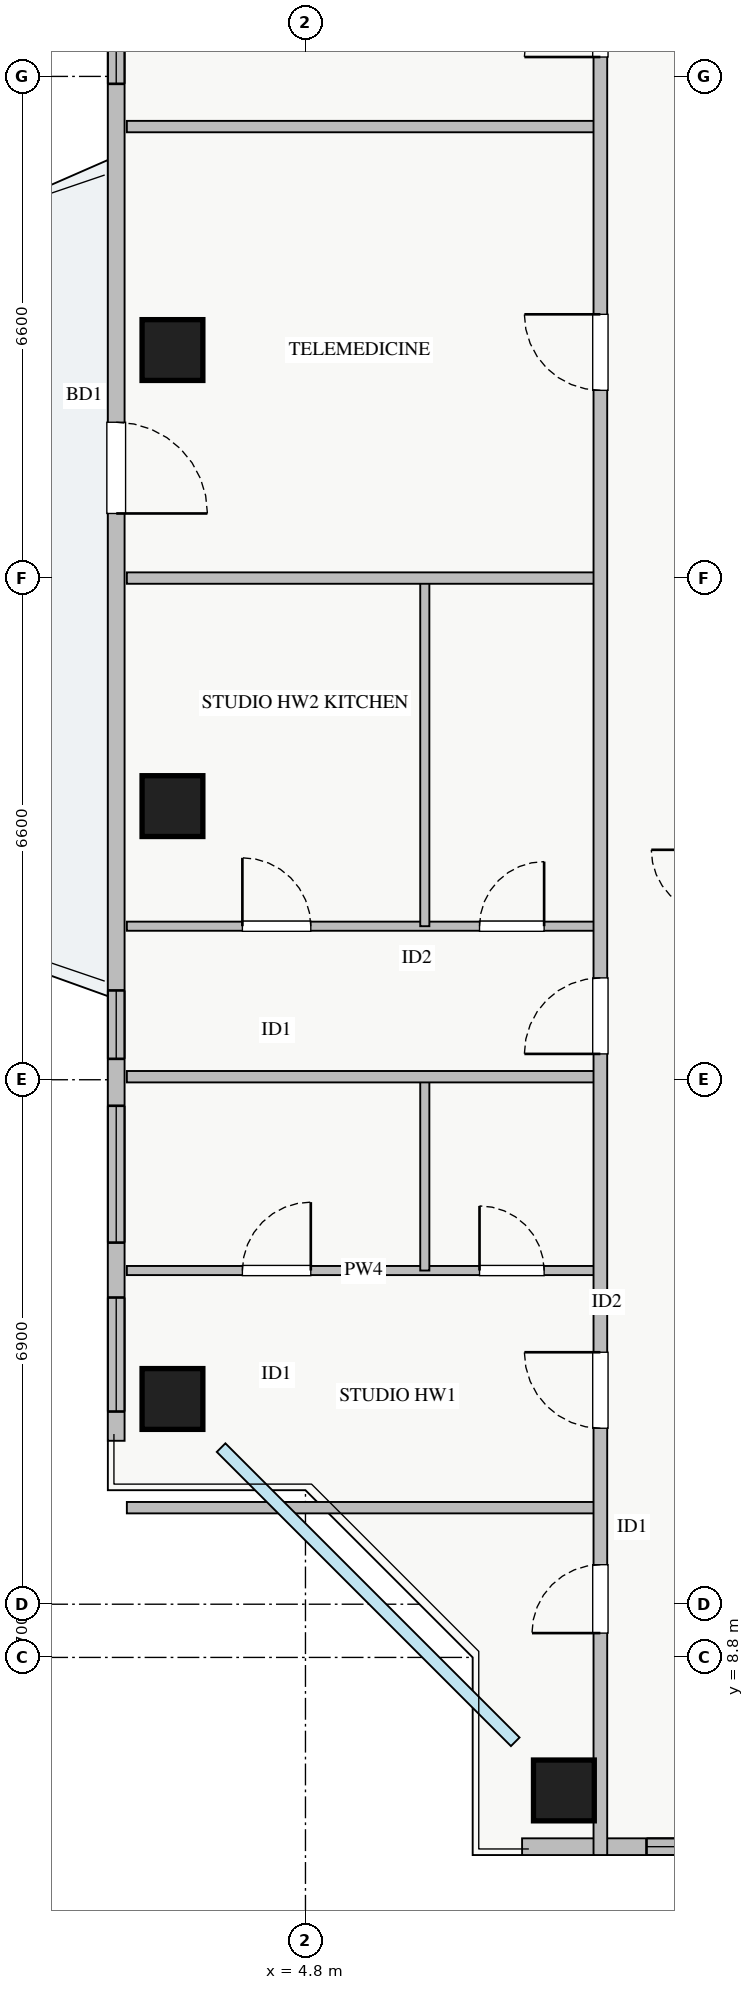
"""IFC4 building model, lengths in metres.
Left out: names, types, materials, properties, quantities, classifications, styles, units other than length and angle.
Written with IfcOpenShell. Run it as: python <this file> out.ifc"""

import sys

from ifc_helpers import new_model, si_unit, direction, frame, frame_2d, origin, origin_2d, place, context, subcontext, project, spatial, rectangle, extrude, source, transform, mapped, element, fill, save


model = new_model("IFC4")
c1 = context("Model", 3, precision=1e-05, world=origin(), true_north=direction((0.0, 1.0)))
c2 = subcontext(c1, "Body", "Model", "MODEL_VIEW")
j1 = project(units=[si_unit("LENGTHUNIT", "METRE"), si_unit("PLANEANGLEUNIT", "RADIAN")], contexts=[c1])
p1 = place(None, origin())
s1 = spatial("IfcSite", under=j1, at=p1, CompositionType="ELEMENT")
p2 = place(p1, origin())
s2 = spatial("IfcBuilding", under=s1, at=p2, CompositionType="ELEMENT")
p3 = place(p2, frame((0.0, 0.0, 216.5)))
s3 = spatial("IfcBuildingStorey", under=s2, at=p3, CompositionType="ELEMENT", Elevation=216.5)
m1 = source(origin(), c2, "Body", "SweptSolid", [
    extrude(rectangle(XDim=0.8, YDim=0.8, at=origin_2d()), origin(), (0.0, 0.0, 1.0), 3.25),
])
for number, where, z_axis, x_axis in (
    (1, (8.2, 7.05, 0.0), (0.0, 0.0, 1.0), (1.0, 0.0, 0.0)),
    (2, (3.05, 26.0, 0.0), (0.0, 0.0, 1.0), (1.0, 0.0, 0.0)),
    (3, (3.05, 20.0, 0.0), (0.0, 0.0, 1.0), (1.0, 0.0, 0.0)),
    (4, (3.05, 12.2, 0.0), (0.0, 0.0, 1.0), (1.0, 0.0, 0.0)),
):
    element("IfcColumn", number, at=place(p3, frame(where, z_axis=z_axis, x_axis=x_axis)), inside=s3, PredefinedType="COLUMN", context=c2, shape_type="MappedRepresentation", body=[
        mapped(m1, transform((0.0, 0.0, 0.0), x_axis=(1.0, 0.0, 0.0), y_axis=(0.0, 1.0, 0.0), z_axis=(0.0, 0.0, 1.0), scale=1.0)),
    ])
p4 = place(p3, frame((7.65, 6.31, 0.0), z_axis=(0.0, 0.0, 1.0), x_axis=(1.0, 0.0, 0.0)))
e5 = element("IfcWall", 5, at=p4, inside=s3, PredefinedType="STANDARD", context=c2, shape_type="SweptSolid", body=[
    extrude(rectangle(XDim=22.7, YDim=0.22, at=frame_2d((11.35, 0.0))), origin(), (0.0, 0.0, 1.0), 2.61),
])
p5 = place(p4, frame((12.2, 0.0, 0.0)))
e6 = element("IfcOpeningElement", 6, at=p5, cuts=e5, PredefinedType="OPENING", context=c2, shape_type="SweptSolid", body=[
    extrude(rectangle(XDim=1.2, YDim=2.1, at=frame_2d((0.6, 1.05))), frame((0.0, 0.12, 0.0), z_axis=(0.0, -1.0, 0.0), x_axis=(1.0, 0.0, 0.0)), (0.0, 0.0, 1.0), 0.24),
])
p6 = place(p4, frame((1.637, 0.0, 0.9)))
e7 = element("IfcOpeningElement", 7, at=p6, cuts=e5, PredefinedType="OPENING", context=c2, shape_type="SweptSolid", body=[
    extrude(rectangle(XDim=2.4, YDim=1.48, at=frame_2d((1.2, 0.74))), frame((0.0, 0.12, 0.0), z_axis=(0.0, -1.0, 0.0), x_axis=(1.0, 0.0, 0.0)), (0.0, 0.0, 1.0), 0.24),
])
p7 = place(p4, frame((7.612, 0.0, 0.9)))
e8 = element("IfcOpeningElement", 8, at=p7, cuts=e5, PredefinedType="OPENING", context=c2, shape_type="SweptSolid", body=[
    extrude(rectangle(XDim=1.8, YDim=1.45, at=frame_2d((0.9, 0.725))), frame((0.0, 0.12, 0.0), z_axis=(0.0, -1.0, 0.0), x_axis=(1.0, 0.0, 0.0)), (0.0, 0.0, 1.0), 0.24),
])
p8 = place(p4, frame((19.837, 0.0, 0.9)))
e9 = element("IfcOpeningElement", 9, at=p8, cuts=e5, PredefinedType="OPENING", context=c2, shape_type="SweptSolid", body=[
    extrude(rectangle(XDim=2.1, YDim=1.5, at=frame_2d((1.05, 0.75))), frame((0.0, 0.12, 0.0), z_axis=(0.0, -1.0, 0.0), x_axis=(1.0, 0.0, 0.0)), (0.0, 0.0, 1.0), 0.24),
])
p9 = place(p3, frame((2.31, 11.65, 0.0), z_axis=(0.0, 0.0, 1.0), x_axis=(0.0, 1.0, 0.0)))
e10 = element("IfcWall", 10, at=p9, inside=s3, PredefinedType="STANDARD", context=c2, shape_type="SweptSolid", body=[
    extrude(rectangle(XDim=22.7, YDim=0.22, at=frame_2d((11.35, 0.0))), origin(), (0.0, 0.0, 1.0), 2.61),
])
p10 = place(p9, frame((12.2, 0.0, 0.0)))
e11 = element("IfcOpeningElement", 11, at=p10, cuts=e10, PredefinedType="OPENING", context=c2, shape_type="SweptSolid", body=[
    extrude(rectangle(XDim=1.2, YDim=2.1, at=frame_2d((0.6, 1.05))), frame((0.0, 0.12, 0.0), z_axis=(0.0, -1.0, 0.0), x_axis=(1.0, 0.0, 0.0)), (0.0, 0.0, 1.0), 0.24),
])
p11 = place(p9, frame((2.607, 0.0, 0.9)))
e12 = element("IfcOpeningElement", 12, at=p11, cuts=e10, PredefinedType="OPENING", context=c2, shape_type="SweptSolid", body=[
    extrude(rectangle(XDim=1.8, YDim=1.5, at=frame_2d((0.9, 0.75))), frame((0.0, 0.12, 0.0), z_axis=(0.0, -1.0, 0.0), x_axis=(1.0, 0.0, 0.0)), (0.0, 0.0, 1.0), 0.24),
])
p12 = place(p9, frame((17.853, 0.0, 0.9)))
e13 = element("IfcOpeningElement", 13, at=p12, cuts=e10, PredefinedType="OPENING", context=c2, shape_type="SweptSolid", body=[
    extrude(rectangle(XDim=2.1, YDim=1.5, at=frame_2d((1.05, 0.75))), frame((0.0, 0.12, 0.0), z_axis=(0.0, -1.0, 0.0), x_axis=(1.0, 0.0, 0.0)), (0.0, 0.0, 1.0), 0.24),
])
p13 = place(p9, frame((0.385, 0.0, 0.9)))
e14 = element("IfcOpeningElement", 14, at=p13, cuts=e10, PredefinedType="OPENING", context=c2, shape_type="SweptSolid", body=[
    extrude(rectangle(XDim=1.5, YDim=1.5, at=frame_2d((0.75, 0.75))), frame((0.0, 0.12, 0.0), z_axis=(0.0, -1.0, 0.0), x_axis=(1.0, 0.0, 0.0)), (0.0, 0.0, 1.0), 0.24),
])
p14 = place(p9, frame((20.835, 0.0, 0.9)))
e15 = element("IfcOpeningElement", 15, at=p14, cuts=e10, PredefinedType="OPENING", context=c2, shape_type="SweptSolid", body=[
    extrude(rectangle(XDim=1.5, YDim=1.5, at=frame_2d((0.75, 0.75))), frame((0.0, 0.12, 0.0), z_axis=(0.0, -1.0, 0.0), x_axis=(1.0, 0.0, 0.0)), (0.0, 0.0, 1.0), 0.24),
])
p15 = place(p9, frame((5.025, 0.0, 0.9)))
e16 = element("IfcOpeningElement", 16, at=p15, cuts=e10, PredefinedType="OPENING", context=c2, shape_type="SweptSolid", body=[
    extrude(rectangle(XDim=0.9, YDim=1.2, at=frame_2d((0.45, 0.6))), frame((0.0, 0.12, 0.0), z_axis=(0.0, -1.0, 0.0), x_axis=(1.0, 0.0, 0.0)), (0.0, 0.0, 1.0), 0.24),
])
p16 = place(p3, frame((2.45, 10.77, 0.0), z_axis=(0.0, 0.0, 1.0), x_axis=(1.0, 0.0, 0.0)))
e17 = element("IfcWall", 17, at=p16, inside=s3, PredefinedType="PARTITIONING", context=c2, shape_type="SweptSolid", body=[
    extrude(rectangle(XDim=6.23, YDim=0.15, at=frame_2d((3.115, 0.0))), origin(), (0.0, 0.0, 1.0), 3.07),
])
p17 = place(p3, frame((2.45, 13.89, 0.0), z_axis=(0.0, 0.0, 1.0), x_axis=(1.0, 0.0, 0.0)))
e18 = element("IfcWall", 18, at=p17, inside=s3, PredefinedType="PLUMBINGWALL", context=c2, shape_type="SweptSolid", body=[
    extrude(rectangle(XDim=6.23, YDim=0.12, at=frame_2d((3.115, 0.0))), origin(), (0.0, 0.0, 1.0), 3.07),
])
p18 = place(p17, frame((1.52, 0.0, 0.0)))
e19 = element("IfcOpeningElement", 19, at=p18, cuts=e18, PredefinedType="OPENING", context=c2, shape_type="SweptSolid", body=[
    extrude(rectangle(XDim=0.9, YDim=2.05, at=frame_2d((0.45, 1.025))), frame((0.0, 0.07, 0.0), z_axis=(0.0, -1.0, 0.0), x_axis=(1.0, 0.0, 0.0)), (0.0, 0.0, 1.0), 0.14),
])
p19 = place(p17, frame((4.64, 0.0, 0.0)))
e20 = element("IfcOpeningElement", 20, at=p19, cuts=e18, PredefinedType="OPENING", context=c2, shape_type="SweptSolid", body=[
    extrude(rectangle(XDim=0.85, YDim=2.05, at=frame_2d((0.425, 1.025))), frame((0.0, 0.07, 0.0), z_axis=(0.0, -1.0, 0.0), x_axis=(1.0, 0.0, 0.0)), (0.0, 0.0, 1.0), 0.14),
])
p20 = place(p3, frame((6.37, 13.89, 0.0), z_axis=(0.0, 0.0, 1.0), x_axis=(0.0, 1.0, 0.0)))
e21 = element("IfcWall", 21, at=p20, inside=s3, PredefinedType="PLUMBINGWALL", context=c2, shape_type="SweptSolid", body=[
    extrude(rectangle(XDim=2.55, YDim=0.12, at=frame_2d((1.275, 0.0))), origin(), (0.0, 0.0, 1.0), 3.07),
])
p21 = place(p3, frame((2.45, 18.42, 0.0), z_axis=(0.0, 0.0, 1.0), x_axis=(1.0, 0.0, 0.0)))
e22 = element("IfcWall", 22, at=p21, inside=s3, PredefinedType="PLUMBINGWALL", context=c2, shape_type="SweptSolid", body=[
    extrude(rectangle(XDim=6.23, YDim=0.12, at=frame_2d((3.115, 0.0))), origin(), (0.0, 0.0, 1.0), 3.07),
])
p22 = place(p21, frame((1.52, 0.0, 0.0)))
e23 = element("IfcOpeningElement", 23, at=p22, cuts=e22, PredefinedType="OPENING", context=c2, shape_type="SweptSolid", body=[
    extrude(rectangle(XDim=0.9, YDim=2.05, at=frame_2d((0.45, 1.025))), frame((0.0, 0.07, 0.0), z_axis=(0.0, -1.0, 0.0), x_axis=(1.0, 0.0, 0.0)), (0.0, 0.0, 1.0), 0.14),
])
p23 = place(p21, frame((4.64, 0.0, 0.0)))
e24 = element("IfcOpeningElement", 24, at=p23, cuts=e22, PredefinedType="OPENING", context=c2, shape_type="SweptSolid", body=[
    extrude(rectangle(XDim=0.85, YDim=2.05, at=frame_2d((0.425, 1.025))), frame((0.0, 0.07, 0.0), z_axis=(0.0, -1.0, 0.0), x_axis=(1.0, 0.0, 0.0)), (0.0, 0.0, 1.0), 0.14),
])
p24 = place(p3, frame((6.37, 18.42, 0.0), z_axis=(0.0, 0.0, 1.0), x_axis=(0.0, 1.0, 0.0)))
e25 = element("IfcWall", 25, at=p24, inside=s3, PredefinedType="PLUMBINGWALL", context=c2, shape_type="SweptSolid", body=[
    extrude(rectangle(XDim=4.58, YDim=0.12, at=frame_2d((2.29, 0.0))), origin(), (0.0, 0.0, 1.0), 3.07),
])
for number, where, z_axis, x_axis in (
    (26, (2.45, 16.44, 0.0), (0.0, 0.0, 1.0), (1.0, 0.0, 0.0)),
    (27, (2.45, 23.0, 0.0), (0.0, 0.0, 1.0), (1.0, 0.0, 0.0)),
    (28, (2.45, 28.94, 0.0), (0.0, 0.0, 1.0), (1.0, 0.0, 0.0)),
):
    element("IfcWall", number, at=place(p3, frame(where, z_axis=z_axis, x_axis=x_axis)), inside=s3, PredefinedType="PARTITIONING", context=c2, shape_type="SweptSolid", body=[
        extrude(rectangle(XDim=6.23, YDim=0.15, at=frame_2d((3.115, 0.0))), origin(), (0.0, 0.0, 1.0), 3.07),
    ])
p25 = place(p3, frame((8.68, 6.2, 0.0), z_axis=(0.0, 0.0, 1.0), x_axis=(0.0, 1.0, 0.0)))
e29 = element("IfcWall", 29, at=p25, inside=s3, PredefinedType="PARTITIONING", context=c2, shape_type="SweptSolid", body=[
    extrude(rectangle(XDim=33.6, YDim=0.18, at=frame_2d((16.8, 0.0))), origin(), (0.0, 0.0, 1.0), 3.07),
])
p26 = place(p25, frame((29.605, 0.0, 0.0)))
e30 = element("IfcOpeningElement", 30, at=p26, cuts=e29, PredefinedType="OPENING", context=c2, shape_type="SweptSolid", body=[
    extrude(rectangle(XDim=0.9, YDim=2.05, at=frame_2d((0.45, 1.025))), frame((0.0, 0.1, 0.0), z_axis=(0.0, -1.0, 0.0), x_axis=(1.0, 0.0, 0.0)), (0.0, 0.0, 1.0), 0.2),
])
p27 = place(p25, frame((2.92, 0.0, 0.0)))
e31 = element("IfcOpeningElement", 31, at=p27, cuts=e29, PredefinedType="OPENING", context=c2, shape_type="SweptSolid", body=[
    extrude(rectangle(XDim=0.9, YDim=2.05, at=frame_2d((0.45, 1.025))), frame((0.0, 0.1, 0.0), z_axis=(0.0, -1.0, 0.0), x_axis=(1.0, 0.0, 0.0)), (0.0, 0.0, 1.0), 0.2),
])
p28 = place(p25, frame((5.615, 0.0, 0.0)))
e32 = element("IfcOpeningElement", 32, at=p28, cuts=e29, PredefinedType="OPENING", context=c2, shape_type="SweptSolid", body=[
    extrude(rectangle(XDim=1.0, YDim=2.05, at=frame_2d((0.5, 1.025))), frame((0.0, 0.1, 0.0), z_axis=(0.0, -1.0, 0.0), x_axis=(1.0, 0.0, 0.0)), (0.0, 0.0, 1.0), 0.2),
])
p29 = place(p25, frame((10.54, 0.0, 0.0)))
e33 = element("IfcOpeningElement", 33, at=p29, cuts=e29, PredefinedType="OPENING", context=c2, shape_type="SweptSolid", body=[
    extrude(rectangle(XDim=1.0, YDim=2.05, at=frame_2d((0.5, 1.025))), frame((0.0, 0.1, 0.0), z_axis=(0.0, -1.0, 0.0), x_axis=(1.0, 0.0, 0.0)), (0.0, 0.0, 1.0), 0.2),
])
p30 = place(p25, frame((19.27, 0.0, 0.0)))
e34 = element("IfcOpeningElement", 34, at=p30, cuts=e29, PredefinedType="OPENING", context=c2, shape_type="SweptSolid", body=[
    extrude(rectangle(XDim=1.0, YDim=2.05, at=frame_2d((0.5, 1.025))), frame((0.0, 0.1, 0.0), z_axis=(0.0, -1.0, 0.0), x_axis=(1.0, 0.0, 0.0)), (0.0, 0.0, 1.0), 0.2),
])
p31 = place(p25, frame((23.655, 0.0, 0.0)))
e35 = element("IfcOpeningElement", 35, at=p31, cuts=e29, PredefinedType="OPENING", context=c2, shape_type="SweptSolid", body=[
    extrude(rectangle(XDim=1.0, YDim=2.05, at=frame_2d((0.5, 1.025))), frame((0.0, 0.1, 0.0), z_axis=(0.0, -1.0, 0.0), x_axis=(1.0, 0.0, 0.0)), (0.0, 0.0, 1.0), 0.2),
])
m2 = source(origin(), c2, "Body", "SweptSolid", [
    extrude(rectangle(XDim=2.4, YDim=1.48, at=frame_2d((1.2, 0.74))), frame((0.0, 0.03, 0.0), z_axis=(0.0, -1.0, 0.0), x_axis=(1.0, 0.0, 0.0)), (0.0, 0.0, 1.0), 0.06),
])
p32 = place(p6, origin())
e36 = element("IfcWindow", 36, at=p32, inside=s3, PartitioningType="TRIPLE_PANEL_VERTICAL", PredefinedType="WINDOW", context=c2, shape_type="MappedRepresentation", body=[
    mapped(m2, transform((0.0, 0.0, 0.0), x_axis=(1.0, 0.0, 0.0), y_axis=(0.0, 1.0, 0.0), z_axis=(0.0, 0.0, 1.0), scale=1.0)),
])
fill(e7, e36)
m3 = source(origin(), c2, "Body", "SweptSolid", [
    extrude(rectangle(XDim=1.2, YDim=2.1, at=frame_2d((0.6, 1.05))), frame((0.0, 0.025, 0.0), z_axis=(0.0, -1.0, 0.0), x_axis=(1.0, 0.0, 0.0)), (0.0, 0.0, 1.0), 0.05),
])
p33 = place(p10, frame((1.2, 0.0, 0.0), z_axis=(0.0, 0.0, 1.0), x_axis=(-1.0, 0.0, 0.0)))
e37 = element("IfcDoor", 37, at=p33, inside=s3, OperationType="SINGLE_SWING_LEFT", PredefinedType="DOOR", context=c2, shape_type="MappedRepresentation", body=[
    mapped(m3, transform((0.0, 0.0, 0.0), x_axis=(1.0, 0.0, 0.0), y_axis=(0.0, 1.0, 0.0), z_axis=(0.0, 0.0, 1.0), scale=1.0)),
])
fill(e11, e37)
m4 = source(origin(), c2, "Body", "SweptSolid", [
    extrude(rectangle(XDim=1.8, YDim=1.5, at=frame_2d((0.9, 0.75))), frame((0.0, 0.03, 0.0), z_axis=(0.0, -1.0, 0.0), x_axis=(1.0, 0.0, 0.0)), (0.0, 0.0, 1.0), 0.06),
])
p34 = place(p11, origin())
e38 = element("IfcWindow", 38, at=p34, inside=s3, PartitioningType="TRIPLE_PANEL_VERTICAL", PredefinedType="WINDOW", context=c2, shape_type="MappedRepresentation", body=[
    mapped(m4, transform((0.0, 0.0, 0.0), x_axis=(1.0, 0.0, 0.0), y_axis=(0.0, 1.0, 0.0), z_axis=(0.0, 0.0, 1.0), scale=1.0)),
])
fill(e12, e38)
m5 = source(origin(), c2, "Body", "SweptSolid", [
    extrude(rectangle(XDim=2.1, YDim=1.5, at=frame_2d((1.05, 0.75))), frame((0.0, 0.03, 0.0), z_axis=(0.0, -1.0, 0.0), x_axis=(1.0, 0.0, 0.0)), (0.0, 0.0, 1.0), 0.06),
])
p35 = place(p12, origin())
e39 = element("IfcWindow", 39, at=p35, inside=s3, PartitioningType="TRIPLE_PANEL_VERTICAL", PredefinedType="WINDOW", context=c2, shape_type="MappedRepresentation", body=[
    mapped(m5, transform((0.0, 0.0, 0.0), x_axis=(1.0, 0.0, 0.0), y_axis=(0.0, 1.0, 0.0), z_axis=(0.0, 0.0, 1.0), scale=1.0)),
])
fill(e13, e39)
m6 = source(origin(), c2, "Body", "SweptSolid", [
    extrude(rectangle(XDim=0.9, YDim=2.05, at=frame_2d((0.45, 1.025))), frame((0.0, 0.025, 0.0), z_axis=(0.0, -1.0, 0.0), x_axis=(1.0, 0.0, 0.0)), (0.0, 0.0, 1.0), 0.05),
])
p36 = place(p18, origin())
e40 = element("IfcDoor", 40, at=p36, inside=s3, OperationType="SINGLE_SWING_RIGHT", PredefinedType="DOOR", context=c2, shape_type="MappedRepresentation", body=[
    mapped(m6, transform((0.0, 0.0, 0.0), x_axis=(1.0, 0.0, 0.0), y_axis=(0.0, 1.0, 0.0), z_axis=(0.0, 0.0, 1.0), scale=1.0)),
])
fill(e19, e40)
m7 = source(origin(), c2, "Body", "SweptSolid", [
    extrude(rectangle(XDim=0.85, YDim=2.05, at=frame_2d((0.425, 1.025))), frame((0.0, 0.025, 0.0), z_axis=(0.0, -1.0, 0.0), x_axis=(1.0, 0.0, 0.0)), (0.0, 0.0, 1.0), 0.05),
])
p37 = place(p19, origin())
e41 = element("IfcDoor", 41, at=p37, inside=s3, OperationType="SINGLE_SWING_LEFT", PredefinedType="DOOR", context=c2, shape_type="MappedRepresentation", body=[
    mapped(m7, transform((0.0, 0.0, 0.0), x_axis=(1.0, 0.0, 0.0), y_axis=(0.0, 1.0, 0.0), z_axis=(0.0, 0.0, 1.0), scale=1.0)),
])
fill(e20, e41)
p38 = place(p22, origin())
e42 = element("IfcDoor", 42, at=p38, inside=s3, OperationType="SINGLE_SWING_LEFT", PredefinedType="DOOR", context=c2, shape_type="MappedRepresentation", body=[
    mapped(m6, transform((0.0, 0.0, 0.0), x_axis=(1.0, 0.0, 0.0), y_axis=(0.0, 1.0, 0.0), z_axis=(0.0, 0.0, 1.0), scale=1.0)),
])
fill(e23, e42)
p39 = place(p23, origin())
e43 = element("IfcDoor", 43, at=p39, inside=s3, OperationType="SINGLE_SWING_RIGHT", PredefinedType="DOOR", context=c2, shape_type="MappedRepresentation", body=[
    mapped(m7, transform((0.0, 0.0, 0.0), x_axis=(1.0, 0.0, 0.0), y_axis=(0.0, 1.0, 0.0), z_axis=(0.0, 0.0, 1.0), scale=1.0)),
])
fill(e24, e43)
p40 = place(p27, origin())
e44 = element("IfcDoor", 44, at=p40, inside=s3, OperationType="SINGLE_SWING_LEFT", PredefinedType="DOOR", context=c2, shape_type="MappedRepresentation", body=[
    mapped(m6, transform((0.0, 0.0, 0.0), x_axis=(1.0, 0.0, 0.0), y_axis=(0.0, 1.0, 0.0), z_axis=(0.0, 0.0, 1.0), scale=1.0)),
])
fill(e31, e44)
m8 = source(origin(), c2, "Body", "SweptSolid", [
    extrude(rectangle(XDim=1.0, YDim=2.05, at=frame_2d((0.5, 1.025))), frame((0.0, 0.025, 0.0), z_axis=(0.0, -1.0, 0.0), x_axis=(1.0, 0.0, 0.0)), (0.0, 0.0, 1.0), 0.05),
])
p41 = place(p28, origin())
e45 = element("IfcDoor", 45, at=p41, inside=s3, OperationType="SINGLE_SWING_RIGHT", PredefinedType="DOOR", context=c2, shape_type="MappedRepresentation", body=[
    mapped(m8, transform((0.0, 0.0, 0.0), x_axis=(1.0, 0.0, 0.0), y_axis=(0.0, 1.0, 0.0), z_axis=(0.0, 0.0, 1.0), scale=1.0)),
])
fill(e32, e45)
p42 = place(p29, origin())
e46 = element("IfcDoor", 46, at=p42, inside=s3, OperationType="SINGLE_SWING_LEFT", PredefinedType="DOOR", context=c2, shape_type="MappedRepresentation", body=[
    mapped(m8, transform((0.0, 0.0, 0.0), x_axis=(1.0, 0.0, 0.0), y_axis=(0.0, 1.0, 0.0), z_axis=(0.0, 0.0, 1.0), scale=1.0)),
])
fill(e33, e46)
p43 = place(p30, origin())
e47 = element("IfcDoor", 47, at=p43, inside=s3, OperationType="SINGLE_SWING_RIGHT", PredefinedType="DOOR", context=c2, shape_type="MappedRepresentation", body=[
    mapped(m8, transform((0.0, 0.0, 0.0), x_axis=(1.0, 0.0, 0.0), y_axis=(0.0, 1.0, 0.0), z_axis=(0.0, 0.0, 1.0), scale=1.0)),
])
fill(e34, e47)
p44 = place(p31, origin())
e48 = element("IfcDoor", 48, at=p44, inside=s3, OperationType="SINGLE_SWING_LEFT", PredefinedType="DOOR", context=c2, shape_type="MappedRepresentation", body=[
    mapped(m8, transform((0.0, 0.0, 0.0), x_axis=(1.0, 0.0, 0.0), y_axis=(0.0, 1.0, 0.0), z_axis=(0.0, 0.0, 1.0), scale=1.0)),
])
fill(e35, e48)
m9 = source(origin(), c2, "Body", "SweptSolid", [
    extrude(rectangle(XDim=1.5, YDim=1.5, at=frame_2d((0.75, 0.75))), frame((0.0, 0.03, 0.0), z_axis=(0.0, -1.0, 0.0), x_axis=(1.0, 0.0, 0.0)), (0.0, 0.0, 1.0), 0.06),
])
p45 = place(p13, origin())
e49 = element("IfcWindow", 49, at=p45, inside=s3, PartitioningType="DOUBLE_PANEL_VERTICAL", PredefinedType="WINDOW", context=c2, shape_type="MappedRepresentation", body=[
    mapped(m9, transform((0.0, 0.0, 0.0), x_axis=(1.0, 0.0, 0.0), y_axis=(0.0, 1.0, 0.0), z_axis=(0.0, 0.0, 1.0), scale=1.0)),
])
fill(e14, e49)
m10 = source(origin(), c2, "Body", "SweptSolid", [
    extrude(rectangle(XDim=0.9, YDim=1.2, at=frame_2d((0.45, 0.6))), frame((0.0, 0.03, 0.0), z_axis=(0.0, -1.0, 0.0), x_axis=(1.0, 0.0, 0.0)), (0.0, 0.0, 1.0), 0.06),
])
p46 = place(p15, origin())
e50 = element("IfcWindow", 50, at=p46, inside=s3, PartitioningType="SINGLE_PANEL", PredefinedType="WINDOW", context=c2, shape_type="MappedRepresentation", body=[
    mapped(m10, transform((0.0, 0.0, 0.0), x_axis=(1.0, 0.0, 0.0), y_axis=(0.0, 1.0, 0.0), z_axis=(0.0, 0.0, 1.0), scale=1.0)),
])
fill(e16, e50)
save(model, sys.argv[1])
